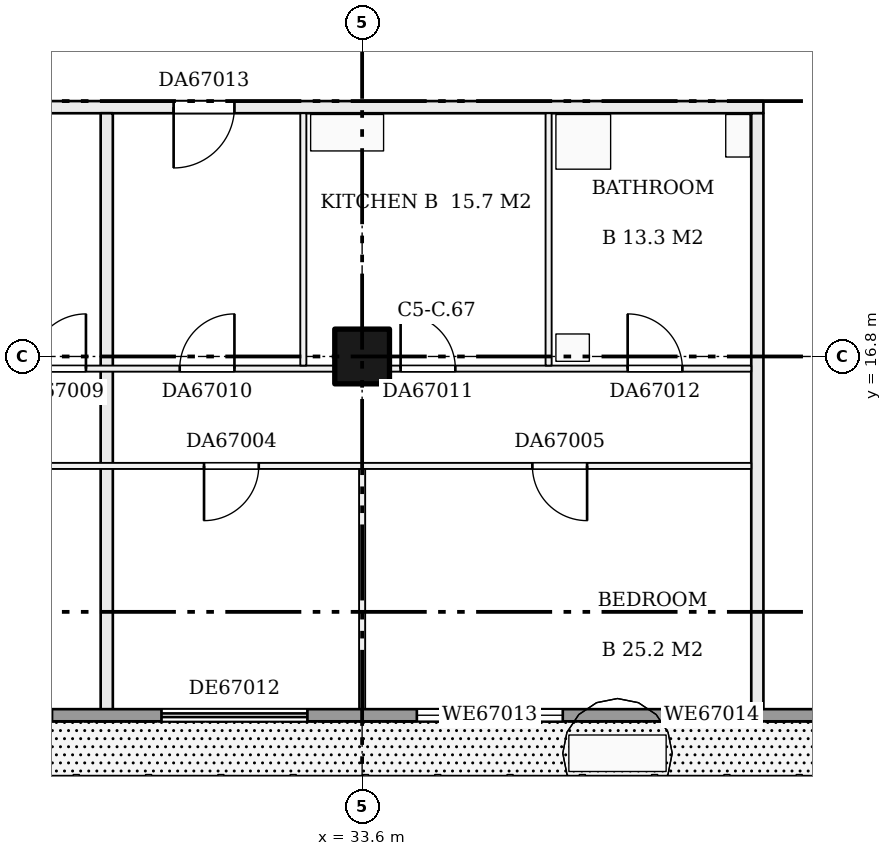
"""IFC4 building model, lengths in metres.
Left out: names, types, materials, properties, quantities, classifications, styles, units other than length and angle.
Written with IfcOpenShell. Run it as: python <this file> out.ifc"""

import sys

from ifc_helpers import new_model, si_unit, direction, frame, frame_2d, origin, origin_2d, place, context, subcontext, project, spatial, rectangle, extrude, element, fill, save


model = new_model("IFC4")
c1 = context("Model", 3, precision=1e-05, world=origin(), true_north=direction((0.0, 1.0)))
c2 = subcontext(c1, "Body", "Model", "MODEL_VIEW")
j1 = project(units=[si_unit("LENGTHUNIT", "METRE"), si_unit("PLANEANGLEUNIT", "RADIAN")], contexts=[c1])
p1 = place(None, origin())
s1 = spatial("IfcSite", under=j1, at=p1, CompositionType="ELEMENT")
p2 = place(p1, origin())
s2 = spatial("IfcBuilding", under=s1, at=p2, CompositionType="ELEMENT")
p3 = place(p2, frame((0.0, 0.0, 256.2)))
s3 = spatial("IfcBuildingStorey", under=s2, at=p3, CompositionType="ELEMENT", Elevation=256.2)
p4 = place(p3, frame((33.6, 16.8, 0.0), z_axis=(0.0, 0.0, 1.0), x_axis=(1.0, 0.0, 0.0)))
e1 = element("IfcColumn", 1, at=p4, inside=s3, PredefinedType="COLUMN", context=c2, shape_type="SweptSolid", body=[
    extrude(rectangle(XDim=0.9, YDim=0.9, at=origin_2d()), origin(), (0.0, 0.0, 1.0), 3.22),
])
p5 = place(p3, frame((21.1, 15.0, 0.0), z_axis=(0.0, 0.0, 1.0), x_axis=(1.0, 0.0, 0.0)))
e2 = element("IfcWall", 2, at=p5, inside=s3, PredefinedType="PARTITIONING", context=c2, shape_type="SweptSolid", body=[
    extrude(rectangle(XDim=18.9, YDim=0.1, at=frame_2d((9.45, 0.0))), origin(), (0.0, 0.0, 1.0), 3.22),
])
p6 = place(p5, frame((1.6, 0.0, 0.0)))
e3 = element("IfcOpeningElement", 3, at=p6, cuts=e2, PredefinedType="OPENING", context=c2, shape_type="SweptSolid", body=[
    extrude(rectangle(XDim=0.9, YDim=2.1, at=frame_2d((0.45, 1.05))), frame((0.0, 0.06, 0.0), z_axis=(0.0, -1.0, 0.0), x_axis=(1.0, 0.0, 0.0)), (0.0, 0.0, 1.0), 0.12),
])
p7 = place(p5, frame((5.7, 0.0, 0.0)))
e4 = element("IfcOpeningElement", 4, at=p7, cuts=e2, PredefinedType="OPENING", context=c2, shape_type="SweptSolid", body=[
    extrude(rectangle(XDim=0.9, YDim=2.1, at=frame_2d((0.45, 1.05))), frame((0.0, 0.06, 0.0), z_axis=(0.0, -1.0, 0.0), x_axis=(1.0, 0.0, 0.0)), (0.0, 0.0, 1.0), 0.12),
])
p8 = place(p5, frame((9.9, 0.0, 0.0)))
e5 = element("IfcOpeningElement", 5, at=p8, cuts=e2, PredefinedType="OPENING", context=c2, shape_type="SweptSolid", body=[
    extrude(rectangle(XDim=0.9, YDim=2.1, at=frame_2d((0.45, 1.05))), frame((0.0, 0.06, 0.0), z_axis=(0.0, -1.0, 0.0), x_axis=(1.0, 0.0, 0.0)), (0.0, 0.0, 1.0), 0.12),
])
p9 = place(p5, frame((15.3, 0.0, 0.0)))
e6 = element("IfcOpeningElement", 6, at=p9, cuts=e2, PredefinedType="OPENING", context=c2, shape_type="SweptSolid", body=[
    extrude(rectangle(XDim=0.9, YDim=2.1, at=frame_2d((0.45, 1.05))), frame((0.0, 0.06, 0.0), z_axis=(0.0, -1.0, 0.0), x_axis=(1.0, 0.0, 0.0)), (0.0, 0.0, 1.0), 0.12),
])
p10 = place(p3, frame((21.1, 16.6, 0.0), z_axis=(0.0, 0.0, 1.0), x_axis=(1.0, 0.0, 0.0)))
e7 = element("IfcWall", 7, at=p10, inside=s3, PredefinedType="PARTITIONING", context=c2, shape_type="SweptSolid", body=[
    extrude(rectangle(XDim=18.9, YDim=0.1, at=frame_2d((9.45, 0.0))), origin(), (0.0, 0.0, 1.0), 3.22),
])
p11 = place(p10, frame((0.4, 0.0, 0.0)))
e8 = element("IfcOpeningElement", 8, at=p11, cuts=e7, PredefinedType="OPENING", context=c2, shape_type="SweptSolid", body=[
    extrude(rectangle(XDim=0.9, YDim=2.1, at=frame_2d((0.45, 1.05))), frame((0.0, 0.06, 0.0), z_axis=(0.0, -1.0, 0.0), x_axis=(1.0, 0.0, 0.0)), (0.0, 0.0, 1.0), 0.12),
])
p12 = place(p10, frame((2.584, 0.0, 0.0)))
e9 = element("IfcOpeningElement", 9, at=p12, cuts=e7, PredefinedType="OPENING", context=c2, shape_type="SweptSolid", body=[
    extrude(rectangle(XDim=0.9, YDim=2.1, at=frame_2d((0.45, 1.05))), frame((0.0, 0.06, 0.0), z_axis=(0.0, -1.0, 0.0), x_axis=(1.0, 0.0, 0.0)), (0.0, 0.0, 1.0), 0.12),
])
p13 = place(p10, frame((5.068, 0.0, 0.0)))
e10 = element("IfcOpeningElement", 10, at=p13, cuts=e7, PredefinedType="OPENING", context=c2, shape_type="SweptSolid", body=[
    extrude(rectangle(XDim=0.9, YDim=2.1, at=frame_2d((0.45, 1.05))), frame((0.0, 0.06, 0.0), z_axis=(0.0, -1.0, 0.0), x_axis=(1.0, 0.0, 0.0)), (0.0, 0.0, 1.0), 0.12),
])
p14 = place(p10, frame((7.058, 0.0, 0.0)))
e11 = element("IfcOpeningElement", 11, at=p14, cuts=e7, PredefinedType="OPENING", context=c2, shape_type="SweptSolid", body=[
    extrude(rectangle(XDim=0.9, YDim=2.1, at=frame_2d((0.45, 1.05))), frame((0.0, 0.06, 0.0), z_axis=(0.0, -1.0, 0.0), x_axis=(1.0, 0.0, 0.0)), (0.0, 0.0, 1.0), 0.12),
])
p15 = place(p10, frame((9.5, 0.0, 0.0)))
e12 = element("IfcOpeningElement", 12, at=p15, cuts=e7, PredefinedType="OPENING", context=c2, shape_type="SweptSolid", body=[
    extrude(rectangle(XDim=0.9, YDim=2.1, at=frame_2d((0.45, 1.05))), frame((0.0, 0.06, 0.0), z_axis=(0.0, -1.0, 0.0), x_axis=(1.0, 0.0, 0.0)), (0.0, 0.0, 1.0), 0.12),
])
p16 = place(p10, frame((13.133, 0.0, 0.0)))
e13 = element("IfcOpeningElement", 13, at=p16, cuts=e7, PredefinedType="OPENING", context=c2, shape_type="SweptSolid", body=[
    extrude(rectangle(XDim=0.9, YDim=2.1, at=frame_2d((0.45, 1.05))), frame((0.0, 0.06, 0.0), z_axis=(0.0, -1.0, 0.0), x_axis=(1.0, 0.0, 0.0)), (0.0, 0.0, 1.0), 0.12),
])
p17 = place(p10, frame((16.867, 0.0, 0.0)))
e14 = element("IfcOpeningElement", 14, at=p17, cuts=e7, PredefinedType="OPENING", context=c2, shape_type="SweptSolid", body=[
    extrude(rectangle(XDim=0.9, YDim=2.1, at=frame_2d((0.45, 1.05))), frame((0.0, 0.06, 0.0), z_axis=(0.0, -1.0, 0.0), x_axis=(1.0, 0.0, 0.0)), (0.0, 0.0, 1.0), 0.12),
])
p18 = place(p3, frame((20.9, 20.9, 0.0), z_axis=(0.0, 0.0, 1.0), x_axis=(1.0, 0.0, 0.0)))
e15 = element("IfcWall", 15, at=p18, inside=s3, PredefinedType="PARTITIONING", context=c2, shape_type="SweptSolid", body=[
    extrude(rectangle(XDim=19.3, YDim=0.2, at=frame_2d((9.65, 0.0))), origin(), (0.0, 0.0, 1.0), 3.22),
])
p19 = place(p18, frame((9.6, 0.0, 0.0)))
e16 = element("IfcOpeningElement", 16, at=p19, cuts=e15, PredefinedType="OPENING", context=c2, shape_type="SweptSolid", body=[
    extrude(rectangle(XDim=1.0, YDim=2.1, at=frame_2d((0.5, 1.05))), frame((0.0, 0.11, 0.0), z_axis=(0.0, -1.0, 0.0), x_axis=(1.0, 0.0, 0.0)), (0.0, 0.0, 1.0), 0.22),
])
p20 = place(p3, frame((29.4, 10.9, 0.0), z_axis=(0.0, 0.0, 1.0), x_axis=(0.0, 1.0, 0.0)))
e17 = element("IfcWall", 17, at=p20, inside=s3, PredefinedType="PARTITIONING", context=c2, shape_type="SweptSolid", body=[
    extrude(rectangle(XDim=9.9, YDim=0.2, at=frame_2d((4.95, 0.0))), origin(), (0.0, 0.0, 1.0), 3.22),
])
p21 = place(p3, frame((32.633, 16.65, 0.0), z_axis=(0.0, 0.0, 1.0), x_axis=(0.0, 1.0, 0.0)))
e18 = element("IfcWall", 18, at=p21, inside=s3, PredefinedType="PARTITIONING", context=c2, shape_type="SweptSolid", body=[
    extrude(rectangle(XDim=4.15, YDim=0.1, at=frame_2d((2.075, 0.0))), origin(), (0.0, 0.0, 1.0), 3.22),
])
p22 = place(p3, frame((33.6, 10.9, 0.0), z_axis=(0.0, 0.0, 1.0), x_axis=(0.0, 1.0, 0.0)))
e19 = element("IfcWall", 19, at=p22, inside=s3, PredefinedType="PARTITIONING", context=c2, shape_type="SweptSolid", body=[
    extrude(rectangle(XDim=4.05, YDim=0.1, at=frame_2d((2.025, 0.0))), origin(), (0.0, 0.0, 1.0), 3.22),
])
p23 = place(p3, frame((36.667, 16.65, 0.0), z_axis=(0.0, 0.0, 1.0), x_axis=(0.0, 1.0, 0.0)))
e20 = element("IfcWall", 20, at=p23, inside=s3, PredefinedType="PARTITIONING", context=c2, shape_type="SweptSolid", body=[
    extrude(rectangle(XDim=4.15, YDim=0.1, at=frame_2d((2.075, 0.0))), origin(), (0.0, 0.0, 1.0), 3.22),
])
p24 = place(p3, frame((40.1, 10.9, 0.0), z_axis=(0.0, 0.0, 1.0), x_axis=(0.0, 1.0, 0.0)))
e21 = element("IfcWall", 21, at=p24, inside=s3, PredefinedType="PARTITIONING", context=c2, shape_type="SweptSolid", body=[
    extrude(rectangle(XDim=9.9, YDim=0.2, at=frame_2d((4.95, 0.0))), origin(), (0.0, 0.0, 1.0), 3.22),
])
p25 = place(p3, frame((13.2, 10.9, 0.0), z_axis=(0.0, 0.0, 1.0), x_axis=(1.0, 0.0, 0.0)))
e22 = element("IfcWall", 22, at=p25, inside=s3, PredefinedType="SOLIDWALL", context=c2, shape_type="SweptSolid", body=[
    extrude(rectangle(XDim=28.8, YDim=0.2, at=frame_2d((14.4, 0.0))), origin(), (0.0, 0.0, 1.0), 3.22),
])
p26 = place(p25, frame((0.3, 0.0, 0.0)))
e23 = element("IfcOpeningElement", 23, at=p26, cuts=e22, PredefinedType="OPENING", context=c2, shape_type="SweptSolid", body=[
    extrude(rectangle(XDim=2.4, YDim=2.2, at=frame_2d((1.2, 1.1))), frame((0.0, 0.11, 0.0), z_axis=(0.0, -1.0, 0.0), x_axis=(1.0, 0.0, 0.0)), (0.0, 0.0, 1.0), 0.22),
])
p27 = place(p25, frame((4.5, 0.0, 0.0)))
e24 = element("IfcOpeningElement", 24, at=p27, cuts=e22, PredefinedType="OPENING", context=c2, shape_type="SweptSolid", body=[
    extrude(rectangle(XDim=2.4, YDim=2.2, at=frame_2d((1.2, 1.1))), frame((0.0, 0.11, 0.0), z_axis=(0.0, -1.0, 0.0), x_axis=(1.0, 0.0, 0.0)), (0.0, 0.0, 1.0), 0.22),
])
p28 = place(p25, frame((8.7, 0.0, 0.9)))
e25 = element("IfcOpeningElement", 25, at=p28, cuts=e22, PredefinedType="OPENING", context=c2, shape_type="SweptSolid", body=[
    extrude(rectangle(XDim=2.4, YDim=1.5, at=frame_2d((1.2, 0.75))), frame((0.0, 0.11, 0.0), z_axis=(0.0, -1.0, 0.0), x_axis=(1.0, 0.0, 0.0)), (0.0, 0.0, 1.0), 0.22),
])
p29 = place(p25, frame((12.9, 0.0, 0.9)))
e26 = element("IfcOpeningElement", 26, at=p29, cuts=e22, PredefinedType="OPENING", context=c2, shape_type="SweptSolid", body=[
    extrude(rectangle(XDim=2.4, YDim=1.5, at=frame_2d((1.2, 0.75))), frame((0.0, 0.11, 0.0), z_axis=(0.0, -1.0, 0.0), x_axis=(1.0, 0.0, 0.0)), (0.0, 0.0, 1.0), 0.22),
])
p30 = place(p25, frame((17.1, 0.0, 0.0)))
e27 = element("IfcOpeningElement", 27, at=p30, cuts=e22, PredefinedType="OPENING", context=c2, shape_type="SweptSolid", body=[
    extrude(rectangle(XDim=2.4, YDim=2.2, at=frame_2d((1.2, 1.1))), frame((0.0, 0.11, 0.0), z_axis=(0.0, -1.0, 0.0), x_axis=(1.0, 0.0, 0.0)), (0.0, 0.0, 1.0), 0.22),
])
p31 = place(p25, frame((21.3, 0.0, 0.9)))
e28 = element("IfcOpeningElement", 28, at=p31, cuts=e22, PredefinedType="OPENING", context=c2, shape_type="SweptSolid", body=[
    extrude(rectangle(XDim=2.4, YDim=1.5, at=frame_2d((1.2, 0.75))), frame((0.0, 0.11, 0.0), z_axis=(0.0, -1.0, 0.0), x_axis=(1.0, 0.0, 0.0)), (0.0, 0.0, 1.0), 0.22),
])
p32 = place(p25, frame((25.5, 0.0, 0.9)))
e29 = element("IfcOpeningElement", 29, at=p32, cuts=e22, PredefinedType="OPENING", context=c2, shape_type="SweptSolid", body=[
    extrude(rectangle(XDim=1.3, YDim=1.5, at=frame_2d((0.65, 0.75))), frame((0.0, 0.11, 0.0), z_axis=(0.0, -1.0, 0.0), x_axis=(1.0, 0.0, 0.0)), (0.0, 0.0, 1.0), 0.22),
])
p33 = place(p8, frame((0.9, 0.0, 0.0), z_axis=(0.0, 0.0, 1.0), x_axis=(-1.0, 0.0, 0.0)))
e30 = element("IfcDoor", 30, at=p33, inside=s3, OperationType="SINGLE_SWING_RIGHT", PredefinedType="DOOR", context=c2, shape_type="SweptSolid", body=[
    extrude(rectangle(XDim=0.9, YDim=2.1, at=frame_2d((0.45, 1.05))), frame((0.0, 0.025, 0.0), z_axis=(0.0, -1.0, 0.0), x_axis=(1.0, 0.0, 0.0)), (0.0, 0.0, 1.0), 0.05),
])
fill(e5, e30)
p34 = place(p9, frame((0.9, 0.0, 0.0), z_axis=(0.0, 0.0, 1.0), x_axis=(-1.0, 0.0, 0.0)))
e31 = element("IfcDoor", 31, at=p34, inside=s3, OperationType="SINGLE_SWING_LEFT", PredefinedType="DOOR", context=c2, shape_type="SweptSolid", body=[
    extrude(rectangle(XDim=0.9, YDim=2.1, at=frame_2d((0.45, 1.05))), frame((0.0, 0.025, 0.0), z_axis=(0.0, -1.0, 0.0), x_axis=(1.0, 0.0, 0.0)), (0.0, 0.0, 1.0), 0.05),
])
fill(e6, e31)
p35 = place(p14, origin())
e32 = element("IfcDoor", 32, at=p35, inside=s3, OperationType="SINGLE_SWING_RIGHT", PredefinedType="DOOR", context=c2, shape_type="SweptSolid", body=[
    extrude(rectangle(XDim=0.9, YDim=2.1, at=frame_2d((0.45, 1.05))), frame((0.0, 0.025, 0.0), z_axis=(0.0, -1.0, 0.0), x_axis=(1.0, 0.0, 0.0)), (0.0, 0.0, 1.0), 0.05),
])
fill(e11, e32)
p36 = place(p15, origin())
e33 = element("IfcDoor", 33, at=p36, inside=s3, OperationType="SINGLE_SWING_RIGHT", PredefinedType="DOOR", context=c2, shape_type="SweptSolid", body=[
    extrude(rectangle(XDim=0.9, YDim=2.1, at=frame_2d((0.45, 1.05))), frame((0.0, 0.025, 0.0), z_axis=(0.0, -1.0, 0.0), x_axis=(1.0, 0.0, 0.0)), (0.0, 0.0, 1.0), 0.05),
])
fill(e12, e33)
p37 = place(p16, origin())
e34 = element("IfcDoor", 34, at=p37, inside=s3, OperationType="SINGLE_SWING_LEFT", PredefinedType="DOOR", context=c2, shape_type="SweptSolid", body=[
    extrude(rectangle(XDim=0.9, YDim=2.1, at=frame_2d((0.45, 1.05))), frame((0.0, 0.025, 0.0), z_axis=(0.0, -1.0, 0.0), x_axis=(1.0, 0.0, 0.0)), (0.0, 0.0, 1.0), 0.05),
])
fill(e13, e34)
p38 = place(p17, origin())
e35 = element("IfcDoor", 35, at=p38, inside=s3, OperationType="SINGLE_SWING_LEFT", PredefinedType="DOOR", context=c2, shape_type="SweptSolid", body=[
    extrude(rectangle(XDim=0.9, YDim=2.1, at=frame_2d((0.45, 1.05))), frame((0.0, 0.025, 0.0), z_axis=(0.0, -1.0, 0.0), x_axis=(1.0, 0.0, 0.0)), (0.0, 0.0, 1.0), 0.05),
])
fill(e14, e35)
p39 = place(p19, frame((1.0, 0.0, 0.0), z_axis=(0.0, 0.0, 1.0), x_axis=(-1.0, 0.0, 0.0)))
e36 = element("IfcDoor", 36, at=p39, inside=s3, OperationType="SINGLE_SWING_RIGHT", PredefinedType="DOOR", context=c2, shape_type="SweptSolid", body=[
    extrude(rectangle(XDim=1.0, YDim=2.1, at=frame_2d((0.5, 1.05))), frame((0.0, 0.025, 0.0), z_axis=(0.0, -1.0, 0.0), x_axis=(1.0, 0.0, 0.0)), (0.0, 0.0, 1.0), 0.05),
])
fill(e16, e36)
p40 = place(p30, origin())
e37 = element("IfcDoor", 37, at=p40, inside=s3, OperationType="DOUBLE_DOOR_SLIDING", PredefinedType="DOOR", context=c2, shape_type="SweptSolid", body=[
    extrude(rectangle(XDim=2.4, YDim=2.2, at=frame_2d((1.2, 1.1))), frame((0.0, 0.025, 0.0), z_axis=(0.0, -1.0, 0.0), x_axis=(1.0, 0.0, 0.0)), (0.0, 0.0, 1.0), 0.05),
])
fill(e27, e37)
p41 = place(p31, origin())
e38 = element("IfcWindow", 38, at=p41, inside=s3, PartitioningType="SINGLE_PANEL", PredefinedType="WINDOW", context=c2, shape_type="SweptSolid", body=[
    extrude(rectangle(XDim=2.4, YDim=1.5, at=frame_2d((1.2, 0.75))), frame((0.0, 0.03, 0.0), z_axis=(0.0, -1.0, 0.0), x_axis=(1.0, 0.0, 0.0)), (0.0, 0.0, 1.0), 0.06),
])
fill(e28, e38)
p42 = place(p32, origin())
e39 = element("IfcWindow", 39, at=p42, inside=s3, PartitioningType="SINGLE_PANEL", PredefinedType="WINDOW", context=c2, shape_type="SweptSolid", body=[
    extrude(rectangle(XDim=1.3, YDim=1.5, at=frame_2d((0.65, 0.75))), frame((0.0, 0.03, 0.0), z_axis=(0.0, -1.0, 0.0), x_axis=(1.0, 0.0, 0.0)), (0.0, 0.0, 1.0), 0.06),
])
fill(e29, e39)
save(model, sys.argv[1])
